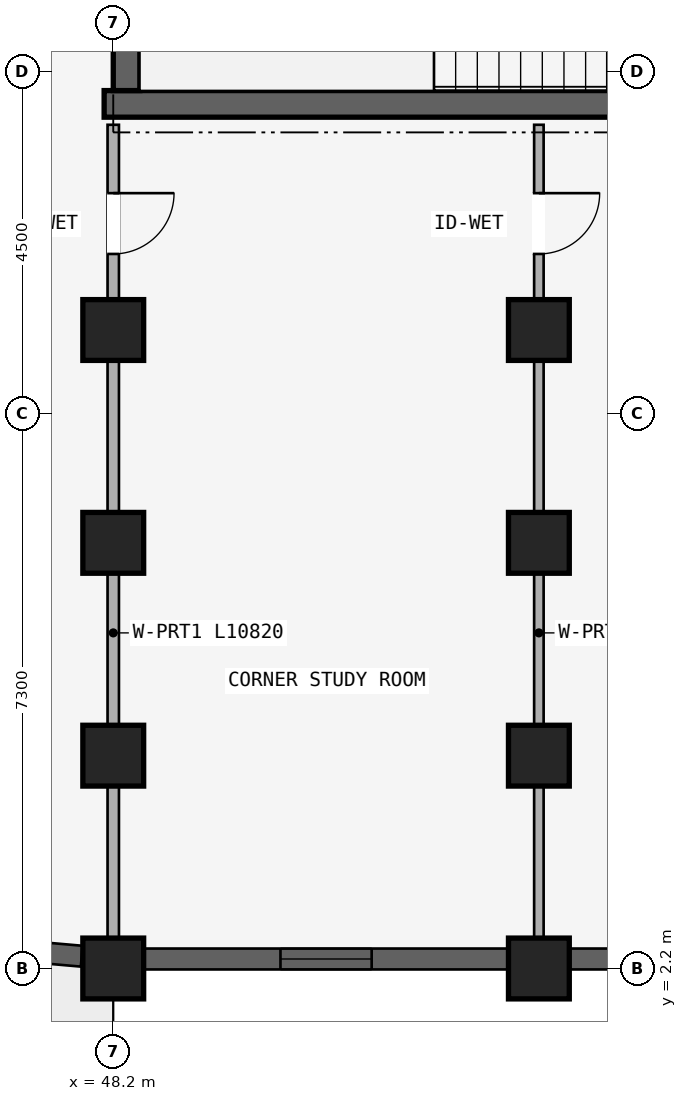
"""IFC4 building model, lengths in metres.
Left out: names, types, materials, properties, quantities, classifications, styles, units other than length and angle.
Written with IfcOpenShell. Run it as: python <this file> out.ifc"""

import sys

from ifc_helpers import new_model, si_unit, direction, frame, frame_2d, origin, origin_2d, place, context, subcontext, project, spatial, rectangle, extrude, element, fill, save


model = new_model("IFC4")
c1 = context("Model", 3, precision=1e-05, world=origin(), true_north=direction((0.0, 1.0)))
c2 = subcontext(c1, "Body", "Model", "MODEL_VIEW")
j1 = project(units=[si_unit("LENGTHUNIT", "METRE"), si_unit("PLANEANGLEUNIT", "RADIAN")], contexts=[c1])
p1 = place(None, origin())
s1 = spatial("IfcSite", under=j1, at=p1, CompositionType="ELEMENT")
p2 = place(p1, origin())
s2 = spatial("IfcBuilding", under=s1, at=p2, CompositionType="ELEMENT")
p3 = place(p2, frame((0.0, 0.0, 15.0)))
s3 = spatial("IfcBuildingStorey", under=s2, at=p3, CompositionType="ELEMENT", Elevation=15.0)
p4 = place(p3, frame((48.08, 13.575, 0.0), z_axis=(0.0, 0.0, 1.0), x_axis=(1.0, 0.0, 0.0)))
e1 = element("IfcWall", 1, at=p4, inside=s3, PredefinedType="SHEAR", context=c2, shape_type="SweptSolid", body=[
    extrude(rectangle(XDim=8.545, YDim=0.35, at=frame_2d((4.272, 0.0))), origin(), (0.0, 0.0, 1.0), 2.93),
])
p5 = place(p3, frame((48.375, 17.35, 0.0), z_axis=(0.0, 0.0, 1.0), x_axis=(0.0, -1.0, 0.0)))
e2 = element("IfcWall", 2, at=p5, inside=s3, PredefinedType="SHEAR", context=c2, shape_type="SweptSolid", body=[
    extrude(rectangle(XDim=3.6, YDim=0.35, at=frame_2d((1.8, 0.0))), origin(), (0.0, 0.0, 1.0), 2.93),
])
for number, where, z_axis, x_axis in (
    (3, (48.2, 10.6, 0.0), (0.0, 0.0, 1.0), (1.0, 0.0, 0.0)),
    (4, (48.2, 7.8, 0.0), (0.0, 0.0, 1.0), (1.0, 0.0, 0.0)),
    (5, (48.2, 5.0, 0.0), (0.0, 0.0, 1.0), (1.0, 0.0, 0.0)),
    (6, (48.2, 2.2, 0.0), (0.0, 0.0, 1.0), (1.0, 0.0, 0.0)),
    (7, (53.8, 10.6, 0.0), (0.0, 0.0, 1.0), (1.0, 0.0, 0.0)),
    (8, (53.8, 7.8, 0.0), (0.0, 0.0, 1.0), (1.0, 0.0, 0.0)),
    (9, (53.8, 5.0, 0.0), (0.0, 0.0, 1.0), (1.0, 0.0, 0.0)),
    (10, (53.8, 2.2, 0.0), (0.0, 0.0, 1.0), (1.0, 0.0, 0.0)),
):
    element("IfcColumn", number, at=place(p3, frame(where, z_axis=z_axis, x_axis=x_axis)), inside=s3, PredefinedType="COLUMN", context=c2, shape_type="SweptSolid", body=[
        extrude(rectangle(XDim=0.8, YDim=0.8, at=origin_2d()), origin(), (0.0, 0.0, 1.0), 2.93),
    ])
p6 = place(p3, frame((53.8, 13.3, 0.0), z_axis=(0.0, 0.0, 1.0), x_axis=(0.0, -1.0, 0.0)))
e11 = element("IfcWall", 11, at=p6, inside=s3, PredefinedType="PARTITIONING", context=c2, shape_type="SweptSolid", body=[
    extrude(rectangle(XDim=10.82, YDim=0.125, at=frame_2d((5.41, 0.0))), origin(), (0.0, 0.0, 1.0), 2.372),
])
p7 = place(p6, frame((0.899, 0.0, 0.0)))
e12 = element("IfcOpeningElement", 12, at=p7, cuts=e11, PredefinedType="OPENING", context=c2, shape_type="SweptSolid", body=[
    extrude(rectangle(XDim=0.8, YDim=2.1, at=frame_2d((0.4, 1.05))), frame((0.0, 0.073, 0.0), z_axis=(0.0, -1.0, 0.0), x_axis=(1.0, 0.0, 0.0)), (0.0, 0.0, 1.0), 0.145),
])
p8 = place(p3, frame((48.2, 13.3, 0.0), z_axis=(0.0, 0.0, 1.0), x_axis=(0.0, -1.0, 0.0)))
e13 = element("IfcWall", 13, at=p8, inside=s3, PredefinedType="PARTITIONING", context=c2, shape_type="SweptSolid", body=[
    extrude(rectangle(XDim=10.82, YDim=0.15, at=frame_2d((5.41, 0.0))), origin(), (0.0, 0.0, 1.0), 2.372),
])
p9 = place(p8, frame((0.899, 0.0, 0.0)))
e14 = element("IfcOpeningElement", 14, at=p9, cuts=e13, PredefinedType="OPENING", context=c2, shape_type="SweptSolid", body=[
    extrude(rectangle(XDim=0.8, YDim=2.1, at=frame_2d((0.4, 1.05))), frame((0.0, 0.085, 0.0), z_axis=(0.0, -1.0, 0.0), x_axis=(1.0, 0.0, 0.0)), (0.0, 0.0, 1.0), 0.17),
])
p10 = place(p3, frame((47.785, 2.362, 0.0), z_axis=(0.0, 0.0, 1.0), x_axis=(-0.99619608453, 0.08713989423, 0.0)))
e15 = element("IfcWall", 15, at=p10, inside=s3, PredefinedType="STANDARD", context=c2, shape_type="SweptSolid", body=[
    extrude(rectangle(XDim=7.164, YDim=0.275, at=frame_2d((3.582, 0.0))), origin(), (0.0, 0.0, 1.0), 2.472),
])
p11 = place(p10, frame((2.457, 0.0, 0.322)))
e16 = element("IfcOpeningElement", 16, at=p11, cuts=e15, PredefinedType="OPENING", context=c2, shape_type="SweptSolid", body=[
    extrude(rectangle(XDim=2.25, YDim=1.95, at=frame_2d((1.125, 0.975))), frame((0.0, 0.147, 0.0), z_axis=(0.0, -1.0, 0.0), x_axis=(1.0, 0.0, 0.0)), (0.0, 0.0, 1.0), 0.295),
])
p12 = place(p3, frame((48.604, 2.325, 0.0), z_axis=(0.0, 0.0, 1.0), x_axis=(1.0, 0.0, 0.0)))
e17 = element("IfcWall", 17, at=p12, inside=s3, PredefinedType="STANDARD", context=c2, shape_type="SweptSolid", body=[
    extrude(rectangle(XDim=4.793, YDim=0.275, at=frame_2d((2.396, 0.0))), origin(), (0.0, 0.0, 1.0), 2.472),
])
p13 = place(p12, frame((1.796, 0.0, 0.772)))
e18 = element("IfcOpeningElement", 18, at=p13, cuts=e17, PredefinedType="OPENING", context=c2, shape_type="SweptSolid", body=[
    extrude(rectangle(XDim=1.2, YDim=1.5, at=frame_2d((0.6, 0.75))), frame((0.0, 0.147, 0.0), z_axis=(0.0, -1.0, 0.0), x_axis=(1.0, 0.0, 0.0)), (0.0, 0.0, 1.0), 0.295),
])
p14 = place(p3, frame((54.204, 2.325, 0.0), z_axis=(0.0, 0.0, 1.0), x_axis=(1.0, 0.0, 0.0)))
e19 = element("IfcWall", 19, at=p14, inside=s3, PredefinedType="STANDARD", context=c2, shape_type="SweptSolid", body=[
    extrude(rectangle(XDim=4.793, YDim=0.275, at=frame_2d((2.396, 0.0))), origin(), (0.0, 0.0, 1.0), 2.472),
])
p15 = place(p14, frame((1.846, 0.0, 0.822)))
e20 = element("IfcOpeningElement", 20, at=p15, cuts=e19, PredefinedType="OPENING", context=c2, shape_type="SweptSolid", body=[
    extrude(rectangle(XDim=1.1, YDim=1.45, at=frame_2d((0.55, 0.725))), frame((0.0, 0.147, 0.0), z_axis=(0.0, -1.0, 0.0), x_axis=(1.0, 0.0, 0.0)), (0.0, 0.0, 1.0), 0.295),
])
p16 = place(p13, origin())
e21 = element("IfcWindow", 21, at=p16, inside=s3, PartitioningType="SINGLE_PANEL", PredefinedType="WINDOW", context=c2, shape_type="SweptSolid", body=[
    extrude(rectangle(XDim=1.2, YDim=1.5, at=frame_2d((0.6, 0.75))), frame((0.0, 0.03, 0.0), z_axis=(0.0, -1.0, 0.0), x_axis=(1.0, 0.0, 0.0)), (0.0, 0.0, 1.0), 0.06),
])
fill(e18, e21)
p17 = place(p7, origin())
e22 = element("IfcDoor", 22, at=p17, inside=s3, OperationType="SINGLE_SWING_LEFT", PredefinedType="DOOR", context=c2, shape_type="SweptSolid", body=[
    extrude(rectangle(XDim=0.8, YDim=2.1, at=frame_2d((0.4, 1.05))), frame((0.0, 0.025, 0.0), z_axis=(0.0, -1.0, 0.0), x_axis=(1.0, 0.0, 0.0)), (0.0, 0.0, 1.0), 0.05),
])
fill(e12, e22)
p18 = place(p9, origin())
e23 = element("IfcDoor", 23, at=p18, inside=s3, OperationType="SINGLE_SWING_LEFT", PredefinedType="DOOR", context=c2, shape_type="SweptSolid", body=[
    extrude(rectangle(XDim=0.8, YDim=2.1, at=frame_2d((0.4, 1.05))), frame((0.0, 0.025, 0.0), z_axis=(0.0, -1.0, 0.0), x_axis=(1.0, 0.0, 0.0)), (0.0, 0.0, 1.0), 0.05),
])
fill(e14, e23)
save(model, sys.argv[1])
